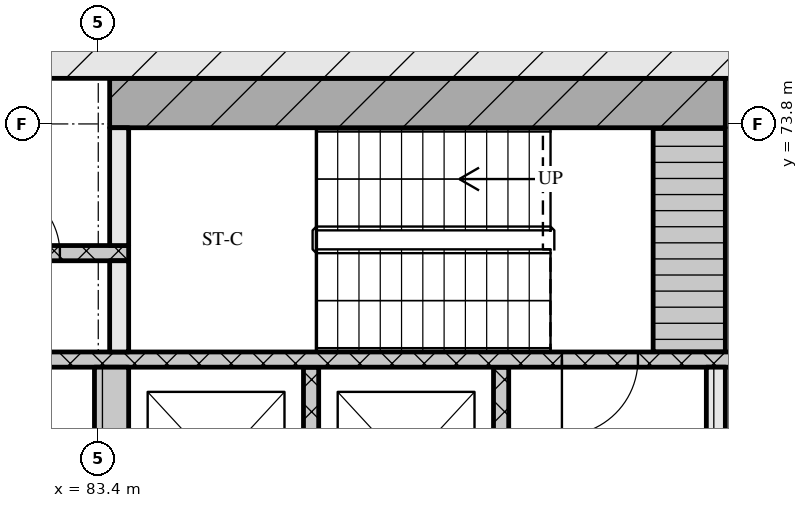
"""IFC4 building model, lengths in metres.
Left out: names, types, materials, properties, quantities, classifications, styles, units other than length and angle.
Written with IfcOpenShell. Run it as: python <this file> out.ifc"""

import sys

from ifc_helpers import new_model, si_unit, direction, frame, frame_2d, origin, place, context, subcontext, project, spatial, rectangle, extrude, element, fill, save


model = new_model("IFC4")
c1 = context("Model", 3, precision=1e-05, world=origin(), true_north=direction((0.0, 1.0)))
c2 = subcontext(c1, "Body", "Model", "MODEL_VIEW")
j1 = project(units=[si_unit("LENGTHUNIT", "METRE"), si_unit("PLANEANGLEUNIT", "RADIAN")], contexts=[c1])
p1 = place(None, origin())
s1 = spatial("IfcSite", under=j1, at=p1, CompositionType="ELEMENT")
p2 = place(p1, origin())
s2 = spatial("IfcBuilding", under=s1, at=p2, CompositionType="ELEMENT")
p3 = place(p2, frame((0.0, 0.0, 23.7)))
s3 = spatial("IfcBuildingStorey", under=s2, at=p3, CompositionType="ELEMENT", Elevation=23.7)
p4 = place(p3, frame((66.6, 75.0, 0.0), z_axis=(0.0, 0.0, 1.0), x_axis=(1.0, 0.0, 0.0)))
e1 = element("IfcWall", 1, at=p4, inside=s3, PredefinedType="SOLIDWALL", context=c2, shape_type="SweptSolid", body=[
    extrude(rectangle(XDim=42.0, YDim=1.2, at=frame_2d((21.0, 0.0))), origin(), (0.0, 0.0, 1.0), 4.2),
])
p5 = place(p3, frame((83.575, 68.0, 0.0), z_axis=(0.0, 0.0, 1.0), x_axis=(0.0, 1.0, 0.0)))
e2 = element("IfcWall", 2, at=p5, inside=s3, PredefinedType="SOLIDWALL", context=c2, shape_type="SweptSolid", body=[
    extrude(rectangle(XDim=2.6, YDim=0.45, at=frame_2d((1.3, 0.0))), origin(), (0.0, 0.0, 1.0), 4.2),
])
for number, where, z_axis, x_axis in (
    (3, (86.2, 68.0, 0.0), (0.0, 0.0, 1.0), (0.0, 1.0, 0.0)),
    (4, (88.7, 68.0, 0.0), (0.0, 0.0, 1.0), (0.0, 1.0, 0.0)),
):
    element("IfcWall", number, at=place(p3, frame(where, z_axis=z_axis, x_axis=x_axis)), inside=s3, PredefinedType="SOLIDWALL", context=c2, shape_type="SweptSolid", body=[
        extrude(rectangle(XDim=2.6, YDim=0.2, at=frame_2d((1.3, 0.0))), origin(), (0.0, 0.0, 1.0), 4.2),
    ])
p6 = place(p3, frame((91.525, 68.0, 0.0), z_axis=(0.0, 0.0, 1.0), x_axis=(0.0, 1.0, 0.0)))
e5 = element("IfcWall", 5, at=p6, inside=s3, PredefinedType="SOLIDWALL", context=c2, shape_type="SweptSolid", body=[
    extrude(rectangle(XDim=2.6, YDim=0.25, at=frame_2d((1.3, 0.0))), origin(), (0.0, 0.0, 1.0), 4.2),
])
p7 = place(p3, frame((67.8, 70.7, 0.0), z_axis=(0.0, 0.0, 1.0), x_axis=(1.0, 0.0, 0.0)))
e6 = element("IfcWall", 6, at=p7, inside=s3, PredefinedType="SOLIDWALL", context=c2, shape_type="SweptSolid", body=[
    extrude(rectangle(XDim=39.6, YDim=0.2, at=frame_2d((19.8, 0.0))), origin(), (0.0, 0.0, 1.0), 4.2),
])
p8 = place(p7, frame((0.65, 0.0, 0.0)))
e7 = element("IfcOpeningElement", 7, at=p8, cuts=e6, PredefinedType="OPENING", context=c2, shape_type="SweptSolid", body=[
    extrude(rectangle(XDim=1.1, YDim=2.1, at=frame_2d((0.55, 1.05))), frame((0.0, 0.11, 0.0), z_axis=(0.0, -1.0, 0.0), x_axis=(1.0, 0.0, 0.0)), (0.0, 0.0, 1.0), 0.22),
])
p9 = place(p7, frame((3.25, 0.0, 0.0)))
e8 = element("IfcOpeningElement", 8, at=p9, cuts=e6, PredefinedType="OPENING", context=c2, shape_type="SweptSolid", body=[
    extrude(rectangle(XDim=1.1, YDim=2.1, at=frame_2d((0.55, 1.05))), frame((0.0, 0.11, 0.0), z_axis=(0.0, -1.0, 0.0), x_axis=(1.0, 0.0, 0.0)), (0.0, 0.0, 1.0), 0.22),
])
p10 = place(p7, frame((5.9, 0.0, 0.0)))
e9 = element("IfcOpeningElement", 9, at=p10, cuts=e6, PredefinedType="OPENING", context=c2, shape_type="SweptSolid", body=[
    extrude(rectangle(XDim=1.0, YDim=2.1, at=frame_2d((0.5, 1.05))), frame((0.0, 0.11, 0.0), z_axis=(0.0, -1.0, 0.0), x_axis=(1.0, 0.0, 0.0)), (0.0, 0.0, 1.0), 0.22),
])
p11 = place(p7, frame((21.7, 0.0, 0.0)))
e10 = element("IfcOpeningElement", 10, at=p11, cuts=e6, PredefinedType="OPENING", context=c2, shape_type="SweptSolid", body=[
    extrude(rectangle(XDim=1.0, YDim=2.1, at=frame_2d((0.5, 1.05))), frame((0.0, 0.11, 0.0), z_axis=(0.0, -1.0, 0.0), x_axis=(1.0, 0.0, 0.0)), (0.0, 0.0, 1.0), 0.22),
])
p12 = place(p7, frame((32.7, 0.0, 0.0)))
e11 = element("IfcOpeningElement", 11, at=p12, cuts=e6, PredefinedType="OPENING", context=c2, shape_type="SweptSolid", body=[
    extrude(rectangle(XDim=1.0, YDim=2.1, at=frame_2d((0.5, 1.05))), frame((0.0, 0.11, 0.0), z_axis=(0.0, -1.0, 0.0), x_axis=(1.0, 0.0, 0.0)), (0.0, 0.0, 1.0), 0.22),
])
p13 = place(p7, frame((35.25, 0.0, 0.0)))
e12 = element("IfcOpeningElement", 12, at=p13, cuts=e6, PredefinedType="OPENING", context=c2, shape_type="SweptSolid", body=[
    extrude(rectangle(XDim=1.1, YDim=2.1, at=frame_2d((0.55, 1.05))), frame((0.0, 0.11, 0.0), z_axis=(0.0, -1.0, 0.0), x_axis=(1.0, 0.0, 0.0)), (0.0, 0.0, 1.0), 0.22),
])
p14 = place(p7, frame((37.85, 0.0, 0.0)))
e13 = element("IfcOpeningElement", 13, at=p14, cuts=e6, PredefinedType="OPENING", context=c2, shape_type="SweptSolid", body=[
    extrude(rectangle(XDim=1.1, YDim=2.1, at=frame_2d((0.55, 1.05))), frame((0.0, 0.11, 0.0), z_axis=(0.0, -1.0, 0.0), x_axis=(1.0, 0.0, 0.0)), (0.0, 0.0, 1.0), 0.22),
])
p15 = place(p3, frame((83.675, 70.8, 0.0), z_axis=(0.0, 0.0, 1.0), x_axis=(0.0, 1.0, 0.0)))
e14 = element("IfcWall", 14, at=p15, inside=s3, PredefinedType="SOLIDWALL", context=c2, shape_type="SweptSolid", body=[
    extrude(rectangle(XDim=1.2, YDim=0.25, at=frame_2d((0.6, 0.0))), origin(), (0.0, 0.0, 1.0), 4.2),
])
p16 = place(p3, frame((91.175, 70.8, 0.0), z_axis=(0.0, 0.0, 1.0), x_axis=(0.0, 1.0, 0.0)))
e15 = element("IfcWall", 15, at=p16, inside=s3, PredefinedType="SOLIDWALL", context=c2, shape_type="SweptSolid", body=[
    extrude(rectangle(XDim=2.95, YDim=0.95, at=frame_2d((1.475, 0.0))), origin(), (0.0, 0.0, 1.0), 4.2),
])
p17 = place(p3, frame((72.8, 72.1, 0.0), z_axis=(0.0, 0.0, 1.0), x_axis=(1.0, 0.0, 0.0)))
e16 = element("IfcWall", 16, at=p17, inside=s3, PredefinedType="SOLIDWALL", context=c2, shape_type="SweptSolid", body=[
    extrude(rectangle(XDim=11.0, YDim=0.2, at=frame_2d((5.5, 0.0))), origin(), (0.0, 0.0, 1.0), 4.2),
])
p18 = place(p17, frame((1.25, 0.0, 0.0)))
e17 = element("IfcOpeningElement", 17, at=p18, cuts=e16, PredefinedType="OPENING", context=c2, shape_type="SweptSolid", body=[
    extrude(rectangle(XDim=0.9, YDim=2.1, at=frame_2d((0.45, 1.05))), frame((0.0, 0.11, 0.0), z_axis=(0.0, -1.0, 0.0), x_axis=(1.0, 0.0, 0.0)), (0.0, 0.0, 1.0), 0.22),
])
p19 = place(p17, frame((3.85, 0.0, 0.0)))
e18 = element("IfcOpeningElement", 18, at=p19, cuts=e16, PredefinedType="OPENING", context=c2, shape_type="SweptSolid", body=[
    extrude(rectangle(XDim=0.9, YDim=2.1, at=frame_2d((0.45, 1.05))), frame((0.0, 0.11, 0.0), z_axis=(0.0, -1.0, 0.0), x_axis=(1.0, 0.0, 0.0)), (0.0, 0.0, 1.0), 0.22),
])
p20 = place(p17, frame((6.42, 0.0, 0.0)))
e19 = element("IfcOpeningElement", 19, at=p20, cuts=e16, PredefinedType="OPENING", context=c2, shape_type="SweptSolid", body=[
    extrude(rectangle(XDim=0.9, YDim=2.1, at=frame_2d((0.45, 1.05))), frame((0.0, 0.11, 0.0), z_axis=(0.0, -1.0, 0.0), x_axis=(1.0, 0.0, 0.0)), (0.0, 0.0, 1.0), 0.22),
])
p21 = place(p17, frame((9.195, 0.0, 0.0)))
e20 = element("IfcOpeningElement", 20, at=p21, cuts=e16, PredefinedType="OPENING", context=c2, shape_type="SweptSolid", body=[
    extrude(rectangle(XDim=0.9, YDim=2.1, at=frame_2d((0.45, 1.05))), frame((0.0, 0.11, 0.0), z_axis=(0.0, -1.0, 0.0), x_axis=(1.0, 0.0, 0.0)), (0.0, 0.0, 1.0), 0.22),
])
p22 = place(p3, frame((83.675, 72.2, 0.0), z_axis=(0.0, 0.0, 1.0), x_axis=(0.0, 1.0, 0.0)))
e21 = element("IfcWall", 21, at=p22, inside=s3, PredefinedType="SOLIDWALL", context=c2, shape_type="SweptSolid", body=[
    extrude(rectangle(XDim=1.55, YDim=0.25, at=frame_2d((0.775, 0.0))), origin(), (0.0, 0.0, 1.0), 4.2),
])
p23 = place(p3, frame((83.55, 74.075, 0.0), z_axis=(0.0, 0.0, 1.0), x_axis=(1.0, 0.0, 0.0)))
e22 = element("IfcWall", 22, at=p23, inside=s3, PredefinedType="SOLIDWALL", context=c2, shape_type="SweptSolid", body=[
    extrude(rectangle(XDim=8.1, YDim=0.65, at=frame_2d((4.05, 0.0))), origin(), (0.0, 0.0, 1.0), 4.2),
])
p24 = place(p11, origin())
e23 = element("IfcDoor", 23, at=p24, inside=s3, OperationType="SINGLE_SWING_RIGHT", PredefinedType="DOOR", context=c2, shape_type="SweptSolid", body=[
    extrude(rectangle(XDim=1.0, YDim=2.1, at=frame_2d((0.5, 1.05))), frame((0.0, 0.025, 0.0), z_axis=(0.0, -1.0, 0.0), x_axis=(1.0, 0.0, 0.0)), (0.0, 0.0, 1.0), 0.05),
])
fill(e10, e23)
p25 = place(p21, origin())
e24 = element("IfcDoor", 24, at=p25, inside=s3, OperationType="SINGLE_SWING_LEFT", PredefinedType="DOOR", context=c2, shape_type="SweptSolid", body=[
    extrude(rectangle(XDim=0.9, YDim=2.1, at=frame_2d((0.45, 1.05))), frame((0.0, 0.025, 0.0), z_axis=(0.0, -1.0, 0.0), x_axis=(1.0, 0.0, 0.0)), (0.0, 0.0, 1.0), 0.05),
])
fill(e20, e24)
save(model, sys.argv[1])
